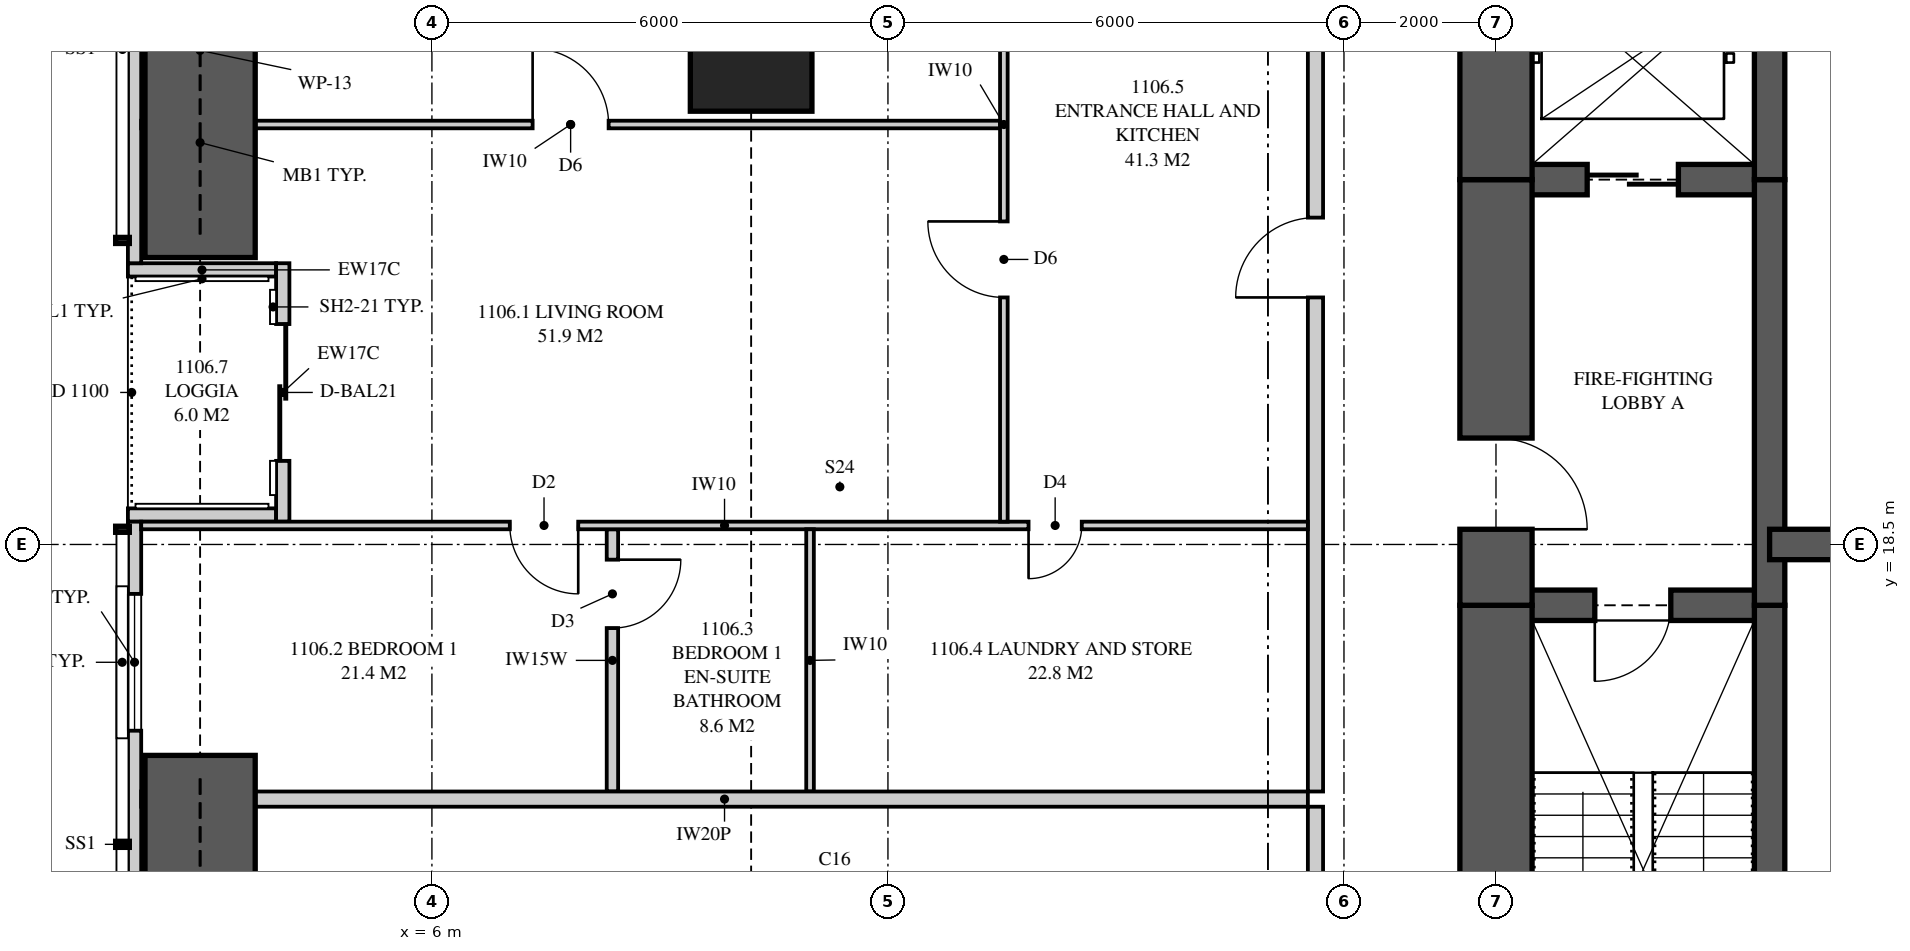
"""IFC4 building model, lengths in metres.
Left out: names, types, materials, properties, quantities, classifications, styles, units other than length and angle.
Written with IfcOpenShell. Run it as: python <this file> out.ifc"""

import sys

from ifc_helpers import new_model, si_unit, direction, frame, frame_2d, origin, origin_2d, place, context, subcontext, project, spatial, polyline, rectangle, outline, extrude, element, fill, save


model = new_model("IFC4")
c1 = context("Model", 3, precision=1e-05, world=origin(), true_north=direction((0.0, 1.0)))
c2 = subcontext(c1, "Body", "Model", "MODEL_VIEW")
j1 = project(units=[si_unit("LENGTHUNIT", "METRE"), si_unit("PLANEANGLEUNIT", "RADIAN")], contexts=[c1])
p1 = place(None, origin())
s1 = spatial("IfcSite", under=j1, at=p1, CompositionType="ELEMENT")
p2 = place(p1, origin())
s2 = spatial("IfcBuilding", under=s1, at=p2, CompositionType="ELEMENT")
p3 = place(p2, frame((0.0, 0.0, 44.45)))
s3 = spatial("IfcBuildingStorey", under=s2, at=p3, CompositionType="ELEMENT", Elevation=44.45)
p4 = place(p3, frame((10.2, 25.0, 0.0), z_axis=(0.0, 0.0, 1.0), x_axis=(1.0, 0.0, 0.0)))
e1 = element("IfcColumn", 1, at=p4, inside=s3, PredefinedType="COLUMN", context=c2, shape_type="SweptSolid", body=[
    extrude(rectangle(XDim=1.6, YDim=1.6, at=origin_2d()), origin(), (0.0, 0.0, 1.0), 3.35),
])
p5 = place(p3, frame((20.0, 26.05, 0.0), z_axis=(0.0, 0.0, 1.0), x_axis=(0.0, -1.0, 0.0)))
e2 = element("IfcWall", 2, at=p5, inside=s3, PredefinedType="SHEAR", context=c2, shape_type="SweptSolid", body=[
    extrude(rectangle(XDim=2.75, YDim=0.95, at=frame_2d((1.375, 0.0))), origin(), (0.0, 0.0, 1.0), 3.35),
])
p6 = place(p3, frame((20.0, 23.3, 0.0), z_axis=(0.0, 0.0, 1.0), x_axis=(0.0, -1.0, 0.0)))
e3 = element("IfcWall", 3, at=p6, inside=s3, PredefinedType="SHEAR", context=c2, shape_type="SweptSolid", body=[
    extrude(rectangle(XDim=5.6, YDim=0.95, at=frame_2d((2.8, 0.0))), origin(), (0.0, 0.0, 1.0), 3.35),
])
p7 = place(p6, frame((3.4, 0.0, 0.0)))
e4 = element("IfcOpeningElement", 4, at=p7, cuts=e3, PredefinedType="OPENING", context=c2, shape_type="SweptSolid", body=[
    extrude(rectangle(XDim=1.2, YDim=2.2, at=frame_2d((0.6, 1.1))), frame((0.0, 0.485, 0.0), z_axis=(0.0, -1.0, 0.0), x_axis=(1.0, 0.0, 0.0)), (0.0, 0.0, 1.0), 0.97),
])
p8 = place(p3, frame((20.0, 17.7, 0.0), z_axis=(0.0, 0.0, 1.0), x_axis=(0.0, -1.0, 0.0)))
e5 = element("IfcWall", 5, at=p8, inside=s3, PredefinedType="SHEAR", context=c2, shape_type="SweptSolid", body=[
    extrude(rectangle(XDim=4.7, YDim=0.95, at=frame_2d((2.35, 0.0))), origin(), (0.0, 0.0, 1.0), 3.35),
])
p9 = place(p3, frame((23.6, 10.95, 0.0), z_axis=(0.0, 0.0, 1.0), x_axis=(0.0, 1.0, 0.0)))
e6 = element("IfcWall", 6, at=p9, inside=s3, PredefinedType="SHEAR", context=c2, shape_type="SweptSolid", body=[
    extrude(rectangle(XDim=6.75, YDim=0.4, at=frame_2d((3.375, 0.0))), origin(), (0.0, 0.0, 1.0), 3.35),
])
p10 = place(p3, frame((23.6, 17.7, 0.0), z_axis=(0.0, 0.0, 1.0), x_axis=(0.0, 1.0, 0.0)))
e7 = element("IfcWall", 7, at=p10, inside=s3, PredefinedType="SHEAR", context=c2, shape_type="SweptSolid", body=[
    extrude(rectangle(XDim=5.6, YDim=0.4, at=frame_2d((2.8, 0.0))), origin(), (0.0, 0.0, 1.0), 3.35),
])
p11 = place(p3, frame((23.6, 23.3, 0.0), z_axis=(0.0, 0.0, 1.0), x_axis=(0.0, 1.0, 0.0)))
e8 = element("IfcWall", 8, at=p11, inside=s3, PredefinedType="SHEAR", context=c2, shape_type="SweptSolid", body=[
    extrude(rectangle(XDim=2.75, YDim=0.4, at=frame_2d((1.375, 0.0))), origin(), (0.0, 0.0, 1.0), 3.35),
])
p12 = place(p3, frame((20.0, 17.7, 0.0), z_axis=(0.0, 0.0, 1.0), x_axis=(1.0, 0.0, 0.0)))
e9 = element("IfcWall", 9, at=p12, inside=s3, PredefinedType="SHEAR", context=c2, shape_type="SweptSolid", body=[
    extrude(rectangle(XDim=3.6, YDim=0.4, at=frame_2d((1.8, 0.0))), origin(), (0.0, 0.0, 1.0), 3.35),
])
p13 = place(p12, frame((1.3, 0.0, 0.0)))
e10 = element("IfcOpeningElement", 10, at=p13, cuts=e9, PredefinedType="OPENING", context=c2, shape_type="SweptSolid", body=[
    extrude(rectangle(XDim=1.0, YDim=2.1, at=frame_2d((0.5, 1.05))), frame((0.0, 0.21, 0.0), z_axis=(0.0, -1.0, 0.0), x_axis=(1.0, 0.0, 0.0)), (0.0, 0.0, 1.0), 0.42),
])
p14 = place(p3, frame((20.0, 23.3, 0.0), z_axis=(0.0, 0.0, 1.0), x_axis=(1.0, 0.0, 0.0)))
e11 = element("IfcWall", 11, at=p14, inside=s3, PredefinedType="SHEAR", context=c2, shape_type="SweptSolid", body=[
    extrude(rectangle(XDim=3.6, YDim=0.4, at=frame_2d((1.8, 0.0))), origin(), (0.0, 0.0, 1.0), 3.35),
])
p15 = place(p14, frame((1.2, 0.0, 0.0)))
e12 = element("IfcOpeningElement", 12, at=p15, cuts=e11, PredefinedType="OPENING", context=c2, shape_type="SweptSolid", body=[
    extrude(rectangle(XDim=1.2, YDim=2.1, at=frame_2d((0.6, 1.05))), frame((0.0, 0.21, 0.0), z_axis=(0.0, -1.0, 0.0), x_axis=(1.0, 0.0, 0.0)), (0.0, 0.0, 1.0), 0.42),
])
p16 = place(p3, frame((23.6, 18.5, 0.0), z_axis=(0.0, 0.0, 1.0), x_axis=(1.0, 0.0, 0.0)))
e13 = element("IfcWall", 13, at=p16, inside=s3, PredefinedType="SHEAR", context=c2, shape_type="SweptSolid", body=[
    extrude(rectangle(XDim=2.4, YDim=0.4, at=frame_2d((1.2, 0.0))), origin(), (0.0, 0.0, 1.0), 3.35),
])
p17 = place(p3, frame((2.087, 34.949, 0.0), z_axis=(0.0, 0.0, 1.0), x_axis=(0.0, -1.0, 0.0)))
e14 = element("IfcWall", 14, at=p17, inside=s3, PredefinedType="SOLIDWALL", context=c2, shape_type="SweptSolid", body=[
    extrude(outline(polyline([(0.0, 0.0), (12.749, 0.0), (12.749, 2.15), (9.949, 2.15), (9.949, 3.11), (9.823, 3.11), (9.823, 2.15), (9.73, 2.15), (9.73, 3.11), (0.0, 3.11), (0.0, 0.0)])), frame((0.0, 0.087, 0.0), z_axis=(0.0, -1.0, 0.0), x_axis=(1.0, 0.0, 0.0)), (0.0, 0.0, 1.0), 0.175),
])
p18 = place(p17, frame((2.757, 0.0, 0.4)))
e15 = element("IfcOpeningElement", 15, at=p18, cuts=e14, PredefinedType="OPENING", context=c2, shape_type="SweptSolid", body=[
    extrude(rectangle(XDim=1.8, YDim=1.7, at=frame_2d((0.9, 0.85))), frame((0.0, 0.097, 0.0), z_axis=(0.0, -1.0, 0.0), x_axis=(1.0, 0.0, 0.0)), (0.0, 0.0, 1.0), 0.195),
])
p19 = place(p17, frame((5.924, 0.0, 0.4)))
e16 = element("IfcOpeningElement", 16, at=p19, cuts=e14, PredefinedType="OPENING", context=c2, shape_type="SweptSolid", body=[
    extrude(rectangle(XDim=1.2, YDim=1.7, at=frame_2d((0.6, 0.85))), frame((0.0, 0.097, 0.0), z_axis=(0.0, -1.0, 0.0), x_axis=(1.0, 0.0, 0.0)), (0.0, 0.0, 1.0), 0.195),
])
p20 = place(p3, frame((2.087, 18.8, 0.0), z_axis=(0.0, 0.0, 1.0), x_axis=(0.0, -1.0, 0.0)))
e17 = element("IfcWall", 17, at=p20, inside=s3, PredefinedType="SOLIDWALL", context=c2, shape_type="SweptSolid", body=[
    extrude(outline(polyline([(0.0, 0.0), (15.749, 0.0), (15.749, 3.11), (6.019, 3.11), (6.019, 2.15), (5.926, 2.15), (5.926, 3.11), (5.8, 3.11), (5.8, 2.15), (0.0, 2.15), (0.0, 0.0)])), frame((0.0, 0.087, 0.0), z_axis=(0.0, -1.0, 0.0), x_axis=(1.0, 0.0, 0.0)), (0.0, 0.0, 1.0), 0.175),
])
p21 = place(p20, frame((0.95, 0.0, 0.4)))
e18 = element("IfcOpeningElement", 18, at=p21, cuts=e17, PredefinedType="OPENING", context=c2, shape_type="SweptSolid", body=[
    extrude(rectangle(XDim=1.8, YDim=1.7, at=frame_2d((0.9, 0.85))), frame((0.0, 0.097, 0.0), z_axis=(0.0, -1.0, 0.0), x_axis=(1.0, 0.0, 0.0)), (0.0, 0.0, 1.0), 0.195),
])
p22 = place(p20, frame((8.69, 0.0, 0.4)))
e19 = element("IfcOpeningElement", 19, at=p22, cuts=e17, PredefinedType="OPENING", context=c2, shape_type="SweptSolid", body=[
    extrude(rectangle(XDim=1.2, YDim=1.7, at=frame_2d((0.6, 0.85))), frame((0.0, 0.097, 0.0), z_axis=(0.0, -1.0, 0.0), x_axis=(1.0, 0.0, 0.0)), (0.0, 0.0, 1.0), 0.195),
])
p23 = place(p20, frame((11.691, 0.0, 0.4)))
e20 = element("IfcOpeningElement", 20, at=p23, cuts=e17, PredefinedType="OPENING", context=c2, shape_type="SweptSolid", body=[
    extrude(rectangle(XDim=1.8, YDim=1.7, at=frame_2d((0.9, 0.85))), frame((0.0, 0.097, 0.0), z_axis=(0.0, -1.0, 0.0), x_axis=(1.0, 0.0, 0.0)), (0.0, 0.0, 1.0), 0.195),
])
p24 = place(p3, frame((4.038, 22.2, 0.0), z_axis=(0.0, 0.0, 1.0), x_axis=(0.0, -1.0, 0.0)))
e21 = element("IfcWall", 21, at=p24, inside=s3, PredefinedType="SOLIDWALL", context=c2, shape_type="SweptSolid", body=[
    extrude(rectangle(XDim=3.4, YDim=0.175, at=frame_2d((1.7, 0.0))), origin(), (0.0, 0.0, 1.0), 3.11),
])
p25 = place(p24, frame((0.8, 0.0, 0.0)))
e22 = element("IfcOpeningElement", 22, at=p25, cuts=e21, PredefinedType="OPENING", context=c2, shape_type="SweptSolid", body=[
    extrude(rectangle(XDim=1.8, YDim=2.1, at=frame_2d((0.9, 1.05))), frame((0.0, 0.097, 0.0), z_axis=(0.0, -1.0, 0.0), x_axis=(1.0, 0.0, 0.0)), (0.0, 0.0, 1.0), 0.195),
])
for number, where, z_axis, x_axis in (
    (23, (2.0, 22.113, 0.0), (0.0, 0.0, 1.0), (1.0, 0.0, 0.0)),
    (24, (2.0, 18.887, 0.0), (0.0, 0.0, 1.0), (1.0, 0.0, 0.0)),
):
    element("IfcWall", number, at=place(p3, frame(where, z_axis=z_axis, x_axis=x_axis)), inside=s3, PredefinedType="SOLIDWALL", context=c2, shape_type="SweptSolid", body=[
        extrude(outline(polyline([(0.0, 0.0), (1.95, 0.0), (1.95, 3.11), (1.75, 3.11), (1.75, 2.15), (0.15, 2.15), (0.15, 3.11), (0.0, 3.11), (0.0, 0.0)])), frame((0.0, 0.087, 0.0), z_axis=(0.0, -1.0, 0.0), x_axis=(1.0, 0.0, 0.0)), (0.0, 0.0, 1.0), 0.175),
    ])
p26 = place(p3, frame((2.175, 15.15, 0.0), z_axis=(0.0, 0.0, 1.0), x_axis=(1.0, 0.0, 0.0)))
e25 = element("IfcWall", 25, at=p26, inside=s3, PredefinedType="PARTITIONING", context=c2, shape_type="SweptSolid", body=[
    extrude(outline(polyline([(0.529, 2.15), (0.0, 2.15), (0.0, 0.0), (0.529, 0.0), (0.529, 0.021), (1.021, 0.021), (1.021, 0.0), (15.35, 0.0), (15.35, 3.11), (9.335, 3.11), (9.335, 2.51), (6.715, 2.51), (6.715, 3.11), (1.685, 3.11), (1.685, 2.15), (1.021, 2.15), (1.021, 2.129), (0.529, 2.129), (0.529, 2.15)])), frame((0.0, 0.1, 0.0), z_axis=(0.0, -1.0, 0.0), x_axis=(1.0, 0.0, 0.0)), (0.0, 0.0, 1.0), 0.2),
])
p27 = place(p3, frame((17.625, 15.25, 0.0), z_axis=(0.0, 0.0, 1.0), x_axis=(0.0, 1.0, 0.0)))
e26 = element("IfcWall", 26, at=p27, inside=s3, PredefinedType="PARTITIONING", context=c2, shape_type="SweptSolid", body=[
    extrude(outline(polyline([(0.0, 0.0), (14.0, 0.0), (14.0, 3.11), (10.087, 3.11), (10.087, 2.541), (9.413, 2.541), (9.413, 3.11), (0.0, 3.11), (0.0, 0.0)])), frame((0.0, 0.1, 0.0), z_axis=(0.0, -1.0, 0.0), x_axis=(1.0, 0.0, 0.0)), (0.0, 0.0, 1.0), 0.2),
])
p28 = place(p27, frame((6.5, 0.0, 0.0)))
e27 = element("IfcOpeningElement", 27, at=p28, cuts=e26, PredefinedType="OPENING", context=c2, shape_type="SweptSolid", body=[
    extrude(rectangle(XDim=1.05, YDim=2.2, at=frame_2d((0.525, 1.1))), frame((0.0, 0.11, 0.0), z_axis=(0.0, -1.0, 0.0), x_axis=(1.0, 0.0, 0.0)), (0.0, 0.0, 1.0), 0.22),
])
p29 = place(p3, frame((2.175, 18.75, 0.0), z_axis=(0.0, 0.0, 1.0), x_axis=(1.0, 0.0, 0.0)))
e28 = element("IfcWall", 28, at=p29, inside=s3, PredefinedType="PARTITIONING", context=c2, shape_type="SweptSolid", body=[
    extrude(outline(polyline([(0.0, 0.0), (15.35, 0.0), (15.35, 3.11), (9.285, 3.11), (9.285, 2.51), (6.765, 2.51), (6.765, 3.11), (1.635, 3.11), (1.635, 2.15), (0.0, 2.15), (0.0, 3.11), (0.0, 0.0)])), frame((0.0, 0.05, 0.0), z_axis=(0.0, -1.0, 0.0), x_axis=(1.0, 0.0, 0.0)), (0.0, 0.0, 1.0), 0.1),
])
p30 = place(p29, frame((4.85, 0.0, 0.0)))
e29 = element("IfcOpeningElement", 29, at=p30, cuts=e28, PredefinedType="OPENING", context=c2, shape_type="SweptSolid", body=[
    extrude(rectangle(XDim=0.9, YDim=2.1, at=frame_2d((0.45, 1.05))), frame((0.0, 0.06, 0.0), z_axis=(0.0, -1.0, 0.0), x_axis=(1.0, 0.0, 0.0)), (0.0, 0.0, 1.0), 0.12),
])
p31 = place(p29, frame((11.675, 0.0, 0.0)))
e30 = element("IfcOpeningElement", 30, at=p31, cuts=e28, PredefinedType="OPENING", context=c2, shape_type="SweptSolid", body=[
    extrude(rectangle(XDim=0.7, YDim=2.1, at=frame_2d((0.35, 1.05))), frame((0.0, 0.06, 0.0), z_axis=(0.0, -1.0, 0.0), x_axis=(1.0, 0.0, 0.0)), (0.0, 0.0, 1.0), 0.12),
])
p32 = place(p3, frame((8.375, 15.25, 0.0), z_axis=(0.0, 0.0, 1.0), x_axis=(0.0, 1.0, 0.0)))
e31 = element("IfcWall", 31, at=p32, inside=s3, PredefinedType="PLUMBINGWALL", context=c2, shape_type="SweptSolid", body=[
    extrude(rectangle(XDim=3.45, YDim=0.15, at=frame_2d((1.725, 0.0))), origin(), (0.0, 0.0, 1.0), 3.11),
])
p33 = place(p32, frame((2.15, 0.0, 0.0)))
e32 = element("IfcOpeningElement", 32, at=p33, cuts=e31, PredefinedType="OPENING", context=c2, shape_type="SweptSolid", body=[
    extrude(rectangle(XDim=0.9, YDim=2.1, at=frame_2d((0.45, 1.05))), frame((0.0, 0.085, 0.0), z_axis=(0.0, -1.0, 0.0), x_axis=(1.0, 0.0, 0.0)), (0.0, 0.0, 1.0), 0.17),
])
p34 = place(p3, frame((10.975, 15.25, 0.0), z_axis=(0.0, 0.0, 1.0), x_axis=(0.0, 1.0, 0.0)))
e33 = element("IfcWall", 33, at=p34, inside=s3, PredefinedType="PARTITIONING", context=c2, shape_type="SweptSolid", body=[
    extrude(outline(polyline([(0.0, 0.0), (3.45, 0.0), (3.45, 3.11), (3.45, 2.51), (0.0, 2.51), (0.0, 3.11), (0.0, 0.0)])), frame((0.0, 0.05, 0.0), z_axis=(0.0, -1.0, 0.0), x_axis=(1.0, 0.0, 0.0)), (0.0, 0.0, 1.0), 0.1),
])
p35 = place(p3, frame((13.525, 18.8, 0.0), z_axis=(0.0, 0.0, 1.0), x_axis=(0.0, 1.0, 0.0)))
e34 = element("IfcWall", 34, at=p35, inside=s3, PredefinedType="PARTITIONING", context=c2, shape_type="SweptSolid", body=[
    extrude(outline(polyline([(0.0, 0.0), (10.45, 0.0), (10.45, 3.11), (6.487, 3.11), (6.487, 2.541), (5.913, 2.541), (5.913, 3.11), (0.0, 3.11), (0.0, 0.0)])), frame((0.0, 0.05, 0.0), z_axis=(0.0, -1.0, 0.0), x_axis=(1.0, 0.0, 0.0)), (0.0, 0.0, 1.0), 0.1),
])
p36 = place(p35, frame((2.95, 0.0, 0.0)))
e35 = element("IfcOpeningElement", 35, at=p36, cuts=e34, PredefinedType="OPENING", context=c2, shape_type="SweptSolid", body=[
    extrude(rectangle(XDim=1.0, YDim=2.1, at=frame_2d((0.5, 1.05))), frame((0.0, 0.06, 0.0), z_axis=(0.0, -1.0, 0.0), x_axis=(1.0, 0.0, 0.0)), (0.0, 0.0, 1.0), 0.12),
])
p37 = place(p3, frame((2.175, 24.025, 0.0), z_axis=(0.0, 0.0, 1.0), x_axis=(1.0, 0.0, 0.0)))
e36 = element("IfcWall", 36, at=p37, inside=s3, PredefinedType="PARTITIONING", context=c2, shape_type="SweptSolid", body=[
    extrude(outline(polyline([(0.529, 2.15), (0.0, 2.15), (0.0, 0.0), (0.529, 0.0), (0.529, 0.798), (1.021, 0.798), (1.021, 0.0), (11.3, 0.0), (11.3, 3.11), (9.285, 3.11), (9.285, 2.51), (6.765, 2.51), (6.765, 3.11), (1.635, 3.11), (1.635, 2.15), (1.021, 2.15), (1.021, 1.352), (0.529, 1.352), (0.529, 2.15)])), frame((0.0, 0.05, 0.0), z_axis=(0.0, -1.0, 0.0), x_axis=(1.0, 0.0, 0.0)), (0.0, 0.0, 1.0), 0.1),
])
p38 = place(p37, frame((5.15, 0.0, 0.0)))
e37 = element("IfcOpeningElement", 37, at=p38, cuts=e36, PredefinedType="OPENING", context=c2, shape_type="SweptSolid", body=[
    extrude(rectangle(XDim=1.0, YDim=2.1, at=frame_2d((0.5, 1.05))), frame((0.0, 0.06, 0.0), z_axis=(0.0, -1.0, 0.0), x_axis=(1.0, 0.0, 0.0)), (0.0, 0.0, 1.0), 0.12),
])
p39 = place(p3, frame((17.625, 13.6, 0.0), z_axis=(0.0, 0.0, 1.0), x_axis=(0.0, 1.0, 0.0)))
e38 = element("IfcWall", 38, at=p39, inside=s3, PredefinedType="PARTITIONING", context=c2, shape_type="SweptSolid", body=[
    extrude(rectangle(XDim=1.45, YDim=0.2, at=frame_2d((0.725, 0.0))), origin(), (0.0, 0.0, 1.0), 3.11),
])
for number, where, z_axis, x_axis in (
    (39, (2.95, 22.275, 0.0), (0.0, 0.0, 1.0), (0.0, 1.0, 0.0)),
    (40, (2.95, 10.275, 0.0), (0.0, 0.0, 1.0), (0.0, 1.0, 0.0)),
):
    element("IfcWall", number, at=place(p3, frame(where, z_axis=z_axis, x_axis=x_axis)), inside=s3, PredefinedType="SHEAR", context=c2, shape_type="SweptSolid", body=[
        extrude(rectangle(XDim=5.45, YDim=1.45, at=frame_2d((2.725, 0.0))), origin(), (0.0, 0.0, 1.0), 3.35),
    ])
p40 = place(p25, origin())
e41 = element("IfcDoor", 41, at=p40, inside=s3, OperationType="SLIDING_TO_LEFT", PredefinedType="DOOR", context=c2, shape_type="SweptSolid", body=[
    extrude(rectangle(XDim=1.8, YDim=2.1, at=frame_2d((0.9, 1.05))), frame((0.0, 0.025, 0.0), z_axis=(0.0, -1.0, 0.0), x_axis=(1.0, 0.0, 0.0)), (0.0, 0.0, 1.0), 0.05),
])
fill(e22, e41)
p41 = place(p21, origin())
e42 = element("IfcWindow", 42, at=p41, inside=s3, PartitioningType="SINGLE_PANEL", PredefinedType="WINDOW", context=c2, shape_type="SweptSolid", body=[
    extrude(rectangle(XDim=1.8, YDim=1.7, at=frame_2d((0.9, 0.85))), frame((0.0, 0.03, 0.0), z_axis=(0.0, -1.0, 0.0), x_axis=(1.0, 0.0, 0.0)), (0.0, 0.0, 1.0), 0.06),
])
fill(e18, e42)
p42 = place(p28, origin())
e43 = element("IfcDoor", 43, at=p42, inside=s3, OperationType="SINGLE_SWING_LEFT", PredefinedType="DOOR", context=c2, shape_type="SweptSolid", body=[
    extrude(rectangle(XDim=1.05, YDim=2.2, at=frame_2d((0.525, 1.1))), frame((0.0, 0.025, 0.0), z_axis=(0.0, -1.0, 0.0), x_axis=(1.0, 0.0, 0.0)), (0.0, 0.0, 1.0), 0.05),
])
fill(e27, e43)
p43 = place(p30, frame((0.9, 0.0, 0.0), z_axis=(0.0, 0.0, 1.0), x_axis=(-1.0, 0.0, 0.0)))
e44 = element("IfcDoor", 44, at=p43, inside=s3, OperationType="SINGLE_SWING_LEFT", PredefinedType="DOOR", context=c2, shape_type="SweptSolid", body=[
    extrude(rectangle(XDim=0.9, YDim=2.1, at=frame_2d((0.45, 1.05))), frame((0.0, 0.025, 0.0), z_axis=(0.0, -1.0, 0.0), x_axis=(1.0, 0.0, 0.0)), (0.0, 0.0, 1.0), 0.05),
])
fill(e29, e44)
p44 = place(p33, frame((0.9, 0.0, 0.0), z_axis=(0.0, 0.0, 1.0), x_axis=(-1.0, 0.0, 0.0)))
e45 = element("IfcDoor", 45, at=p44, inside=s3, OperationType="SINGLE_SWING_LEFT", PredefinedType="DOOR", context=c2, shape_type="SweptSolid", body=[
    extrude(rectangle(XDim=0.9, YDim=2.1, at=frame_2d((0.45, 1.05))), frame((0.0, 0.025, 0.0), z_axis=(0.0, -1.0, 0.0), x_axis=(1.0, 0.0, 0.0)), (0.0, 0.0, 1.0), 0.05),
])
fill(e32, e45)
p45 = place(p31, frame((0.7, 0.0, 0.0), z_axis=(0.0, 0.0, 1.0), x_axis=(-1.0, 0.0, 0.0)))
e46 = element("IfcDoor", 46, at=p45, inside=s3, OperationType="SINGLE_SWING_RIGHT", PredefinedType="DOOR", context=c2, shape_type="SweptSolid", body=[
    extrude(rectangle(XDim=0.7, YDim=2.1, at=frame_2d((0.35, 1.05))), frame((0.0, 0.025, 0.0), z_axis=(0.0, -1.0, 0.0), x_axis=(1.0, 0.0, 0.0)), (0.0, 0.0, 1.0), 0.05),
])
fill(e30, e46)
p46 = place(p36, origin())
e47 = element("IfcDoor", 47, at=p46, inside=s3, OperationType="SINGLE_SWING_RIGHT", PredefinedType="DOOR", context=c2, shape_type="SweptSolid", body=[
    extrude(rectangle(XDim=1.0, YDim=2.1, at=frame_2d((0.5, 1.05))), frame((0.0, 0.025, 0.0), z_axis=(0.0, -1.0, 0.0), x_axis=(1.0, 0.0, 0.0)), (0.0, 0.0, 1.0), 0.05),
])
fill(e35, e47)
p47 = place(p38, origin())
e48 = element("IfcDoor", 48, at=p47, inside=s3, OperationType="SINGLE_SWING_LEFT", PredefinedType="DOOR", context=c2, shape_type="SweptSolid", body=[
    extrude(rectangle(XDim=1.0, YDim=2.1, at=frame_2d((0.5, 1.05))), frame((0.0, 0.025, 0.0), z_axis=(0.0, -1.0, 0.0), x_axis=(1.0, 0.0, 0.0)), (0.0, 0.0, 1.0), 0.05),
])
fill(e37, e48)
p48 = place(p13, frame((1.0, 0.0, 0.0), z_axis=(0.0, 0.0, 1.0), x_axis=(-1.0, 0.0, 0.0)))
e49 = element("IfcDoor", 49, at=p48, inside=s3, OperationType="SINGLE_SWING_RIGHT", PredefinedType="DOOR", context=c2, shape_type="SweptSolid", body=[
    extrude(rectangle(XDim=1.0, YDim=2.1, at=frame_2d((0.5, 1.05))), frame((0.0, 0.025, 0.0), z_axis=(0.0, -1.0, 0.0), x_axis=(1.0, 0.0, 0.0)), (0.0, 0.0, 1.0), 0.05),
])
fill(e10, e49)
p49 = place(p7, origin())
e50 = element("IfcDoor", 50, at=p49, inside=s3, OperationType="SINGLE_SWING_RIGHT", PredefinedType="DOOR", context=c2, shape_type="SweptSolid", body=[
    extrude(rectangle(XDim=1.2, YDim=2.2, at=frame_2d((0.6, 1.1))), frame((0.0, 0.025, 0.0), z_axis=(0.0, -1.0, 0.0), x_axis=(1.0, 0.0, 0.0)), (0.0, 0.0, 1.0), 0.05),
])
fill(e4, e50)
p50 = place(p15, origin())
e51 = element("IfcDoor", 51, at=p50, inside=s3, OperationType="SLIDING_TO_LEFT", PredefinedType="DOOR", context=c2, shape_type="SweptSolid", body=[
    extrude(rectangle(XDim=1.2, YDim=2.1, at=frame_2d((0.6, 1.05))), frame((0.0, 0.025, 0.0), z_axis=(0.0, -1.0, 0.0), x_axis=(1.0, 0.0, 0.0)), (0.0, 0.0, 1.0), 0.05),
])
fill(e12, e51)
save(model, sys.argv[1])
